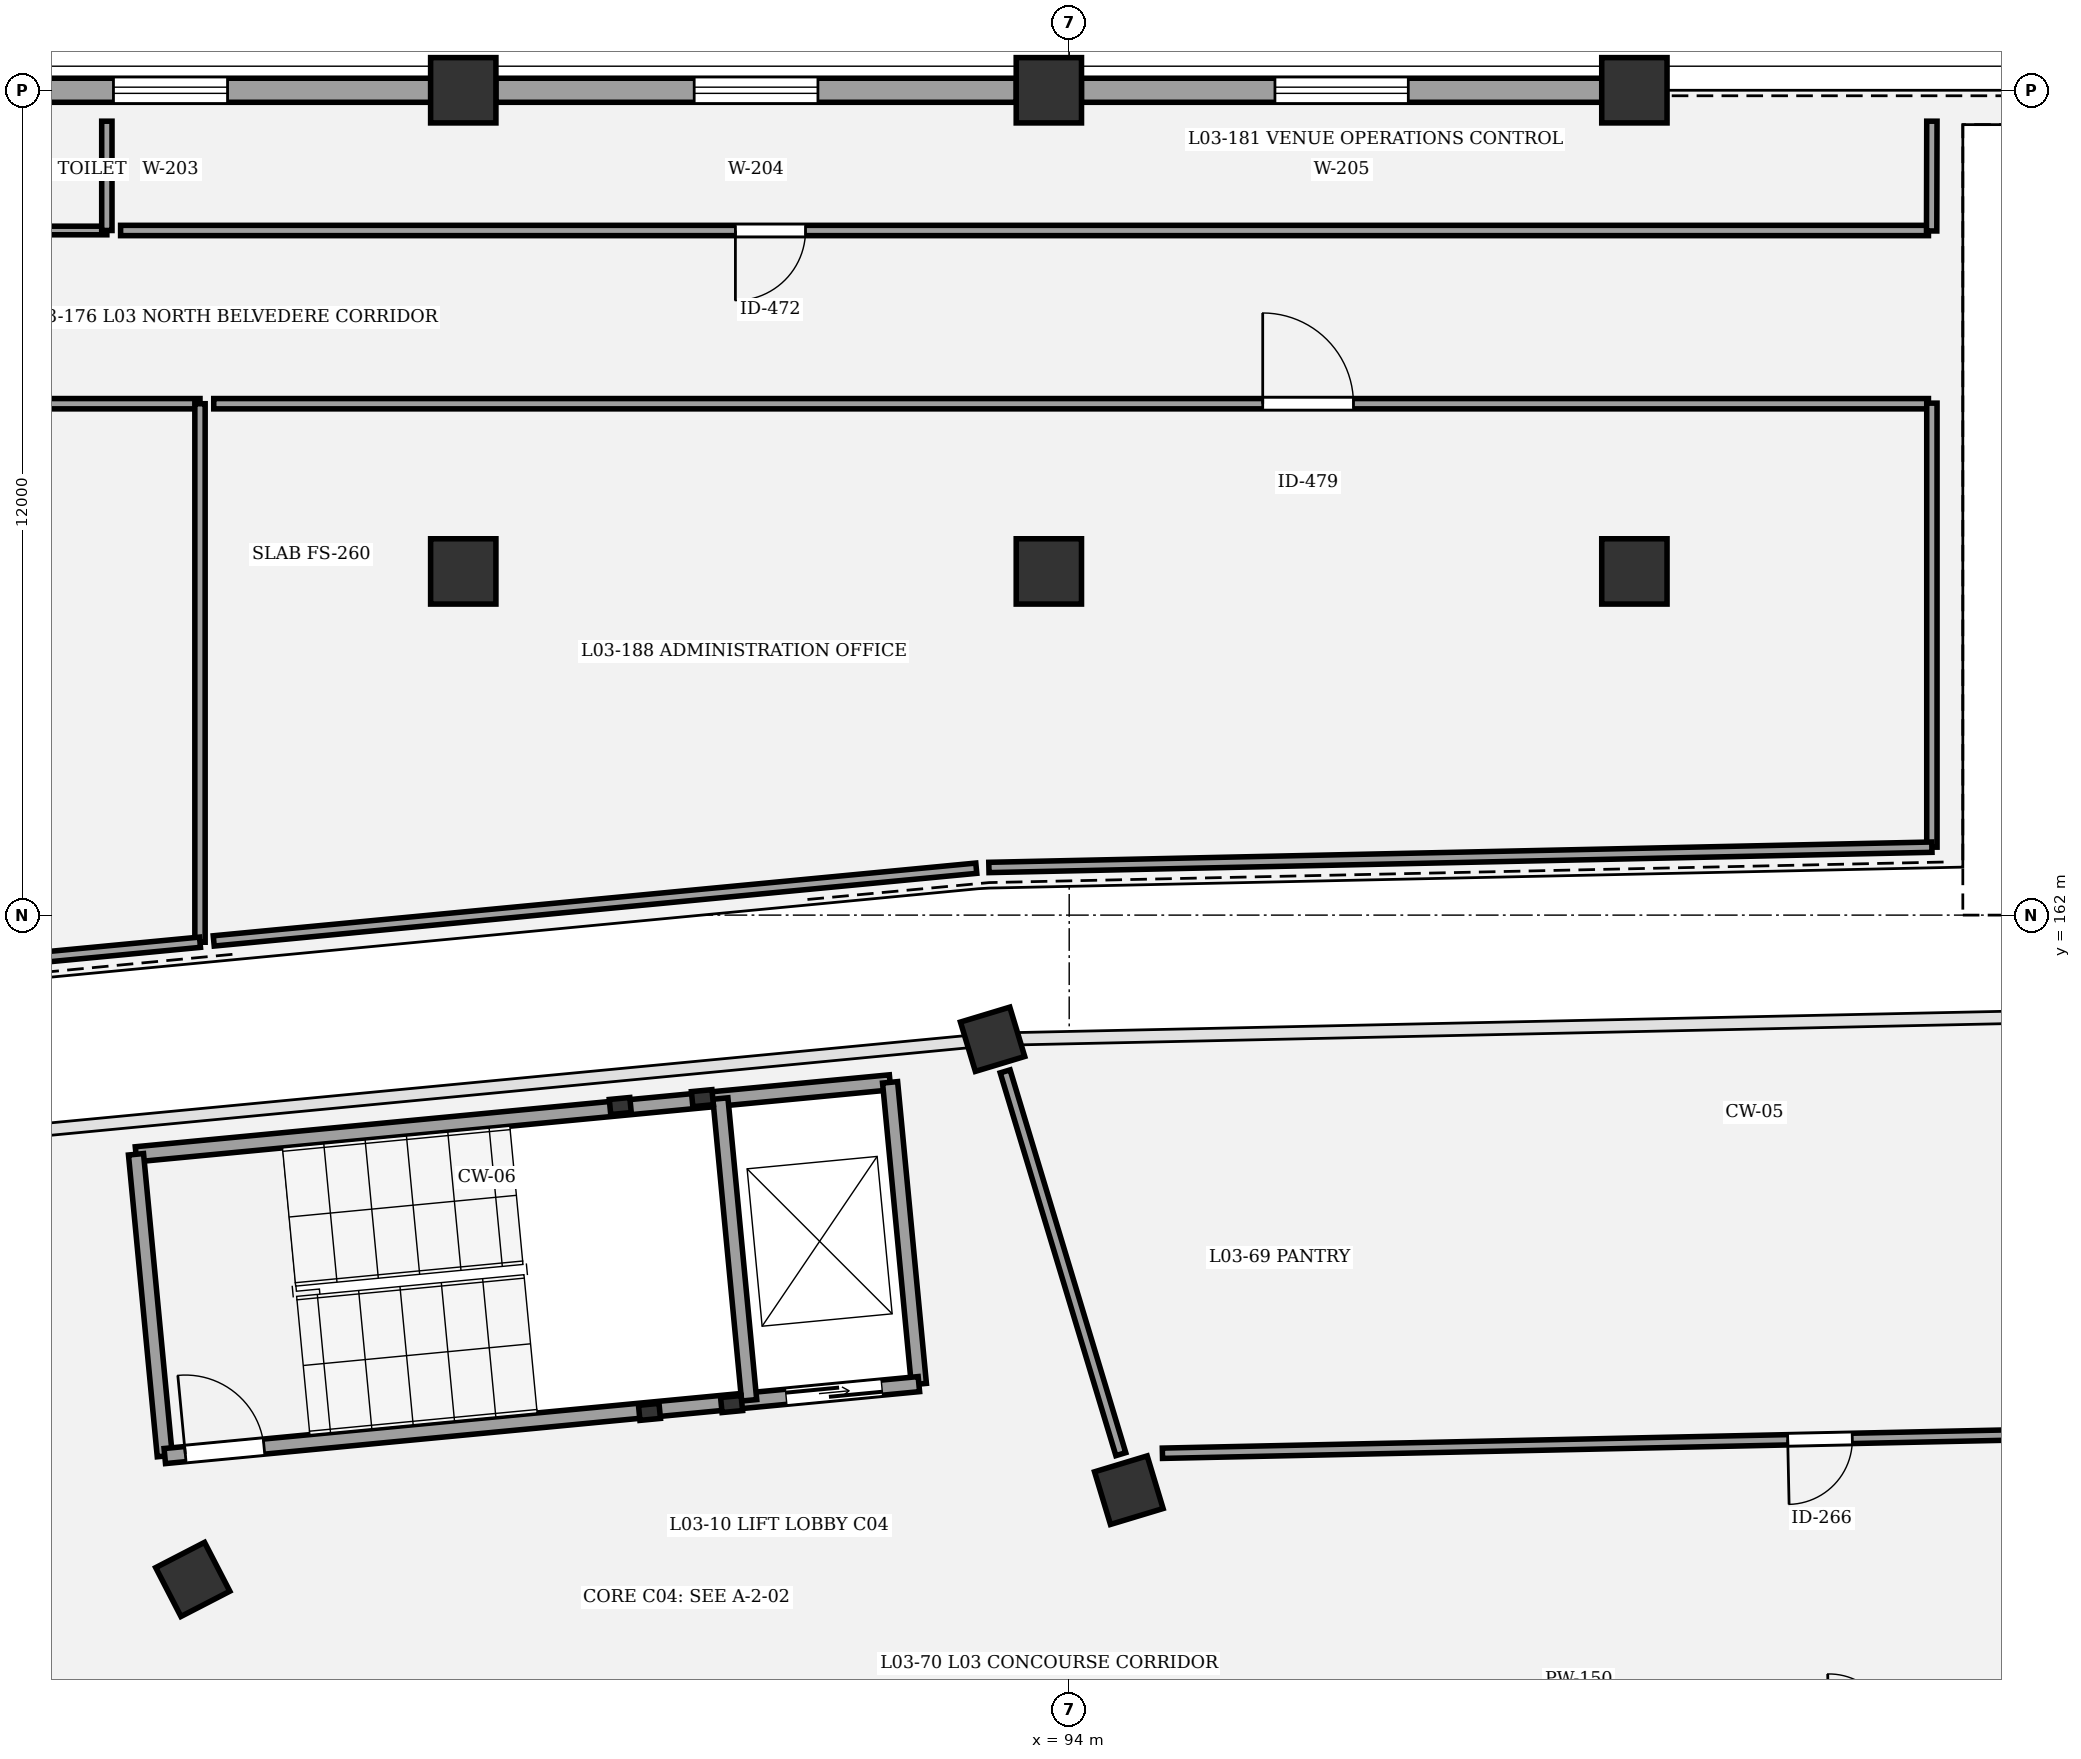
"""IFC4 building model, lengths in metres.
Left out: names, types, materials, properties, quantities, classifications, styles, units other than length and angle.
Written with IfcOpenShell. Run it as: python <this file> out.ifc"""

import sys

from ifc_helpers import new_model, si_unit, direction, frame, frame_2d, origin, origin_2d, place, context, subcontext, project, spatial, rectangle, circle, extrude, element, fill, save


model = new_model("IFC4")
c1 = context("Model", 3, precision=1e-05, world=origin(), true_north=direction((0.0, 1.0)))
c2 = subcontext(c1, "Body", "Model", "MODEL_VIEW")
j1 = project(units=[si_unit("LENGTHUNIT", "METRE"), si_unit("PLANEANGLEUNIT", "RADIAN")], contexts=[c1])
p1 = place(None, origin())
s1 = spatial("IfcSite", under=j1, at=p1, CompositionType="ELEMENT")
p2 = place(p1, origin())
s2 = spatial("IfcBuilding", under=s1, at=p2, CompositionType="ELEMENT")
p3 = place(p2, frame((0.0, 0.0, 14.7)))
s3 = spatial("IfcBuildingStorey", under=s2, at=p3, CompositionType="ELEMENT", Elevation=14.7)
p4 = place(p3, frame((94.867, 153.634, 0.0), z_axis=(0.0, 0.0, 1.0), x_axis=(-0.289198876314, 0.957269037387, 0.0)))
e1 = element("IfcColumn", 1, at=p4, inside=s3, PredefinedType="COLUMN", context=c2, shape_type="SweptSolid", body=[
    extrude(rectangle(XDim=0.8, YDim=0.8, at=origin_2d()), origin(), (0.0, 0.0, 1.0), 4.5),
])
p5 = place(p3, frame((92.885, 160.194, 0.0), z_axis=(0.0, 0.0, 1.0), x_axis=(-0.289198876314, 0.957269037387, 0.0)))
e2 = element("IfcColumn", 2, at=p5, inside=s3, PredefinedType="COLUMN", context=c2, shape_type="SweptSolid", body=[
    extrude(rectangle(XDim=0.75, YDim=0.75, at=origin_2d()), origin(), (0.0, 0.0, 1.0), 4.5),
])
p6 = place(p3, frame((81.25, 152.335, 0.0), z_axis=(0.0, 0.0, 1.0), x_axis=(-0.458959712465, 0.888457079624, 0.0)))
e3 = element("IfcColumn", 3, at=p6, inside=s3, PredefinedType="COLUMN", context=c2, shape_type="SweptSolid", body=[
    extrude(rectangle(XDim=0.8, YDim=0.8, at=origin_2d()), origin(), (0.0, 0.0, 1.0), 4.5),
])
for number, where, z_axis, x_axis in (
    (4, (85.185, 167.0, 0.0), (0.0, 0.0, 1.0), (1.0, 0.0, 0.0)),
    (5, (85.185, 174.0, 0.0), (0.0, 0.0, 1.0), (1.0, 0.0, 0.0)),
    (6, (93.704, 167.0, 0.0), (0.0, 0.0, 1.0), (1.0, 0.0, 0.0)),
    (7, (93.704, 174.0, 0.0), (0.0, 0.0, 1.0), (1.0, 0.0, 0.0)),
    (8, (102.222, 167.0, 0.0), (0.0, 0.0, 1.0), (1.0, 0.0, 0.0)),
    (9, (102.222, 174.0, 0.0), (0.0, 0.0, 1.0), (1.0, 0.0, 0.0)),
):
    element("IfcColumn", number, at=place(p3, frame(where, z_axis=z_axis, x_axis=x_axis)), inside=s3, PredefinedType="COLUMN", context=c2, shape_type="SweptSolid", body=[
        extrude(circle(Radius=0.475, at=origin_2d()), origin(), (0.0, 0.0, 1.0), 4.5),
    ])
p7 = place(p3, frame((77.14, 174.0, 0.0), z_axis=(0.0, 0.0, 1.0), x_axis=(1.0, 0.0, 0.0)))
e10 = element("IfcWall", 10, at=p7, inside=s3, PredefinedType="STANDARD", context=c2, shape_type="SweptSolid", body=[
    extrude(rectangle(XDim=7.572, YDim=0.35, at=frame_2d((3.786, 0.0))), origin(), (0.0, 0.0, 1.0), 3.26),
])
p8 = place(p7, frame((2.956, 0.0, 0.9)))
e11 = element("IfcOpeningElement", 11, at=p8, cuts=e10, PredefinedType="OPENING", context=c2, shape_type="SweptSolid", body=[
    extrude(rectangle(XDim=1.66, YDim=1.95, at=frame_2d((0.83, 0.975))), frame((0.0, 0.185, 0.0), z_axis=(0.0, -1.0, 0.0), x_axis=(1.0, 0.0, 0.0)), (0.0, 0.0, 1.0), 0.37),
])
p9 = place(p3, frame((85.658, 174.0, 0.0), z_axis=(0.0, 0.0, 1.0), x_axis=(1.0, 0.0, 0.0)))
e12 = element("IfcWall", 12, at=p9, inside=s3, PredefinedType="STANDARD", context=c2, shape_type="SweptSolid", body=[
    extrude(rectangle(XDim=7.573, YDim=0.35, at=frame_2d((3.787, 0.0))), origin(), (0.0, 0.0, 1.0), 3.26),
])
p10 = place(p9, frame((2.886, 0.0, 0.9)))
e13 = element("IfcOpeningElement", 13, at=p10, cuts=e12, PredefinedType="OPENING", context=c2, shape_type="SweptSolid", body=[
    extrude(rectangle(XDim=1.8, YDim=1.95, at=frame_2d((0.9, 0.975))), frame((0.0, 0.185, 0.0), z_axis=(0.0, -1.0, 0.0), x_axis=(1.0, 0.0, 0.0)), (0.0, 0.0, 1.0), 0.37),
])
p11 = place(p3, frame((94.177, 174.0, 0.0), z_axis=(0.0, 0.0, 1.0), x_axis=(1.0, 0.0, 0.0)))
e14 = element("IfcWall", 14, at=p11, inside=s3, PredefinedType="STANDARD", context=c2, shape_type="SweptSolid", body=[
    extrude(rectangle(XDim=7.572, YDim=0.35, at=frame_2d((3.786, 0.0))), origin(), (0.0, 0.0, 1.0), 3.26),
])
p12 = place(p11, frame((2.816, 0.0, 0.9)))
e15 = element("IfcOpeningElement", 15, at=p12, cuts=e14, PredefinedType="OPENING", context=c2, shape_type="SweptSolid", body=[
    extrude(rectangle(XDim=1.94, YDim=1.95, at=frame_2d((0.97, 0.975))), frame((0.0, 0.185, 0.0), z_axis=(0.0, -1.0, 0.0), x_axis=(1.0, 0.0, 0.0)), (0.0, 0.0, 1.0), 0.37),
])
for number, where, z_axis, x_axis in (
    (16, (87.894, 154.773, 0.0), (0.0, 0.0, 1.0), (0.995, 0.095, 0.0)),
    (17, (89.088, 154.887, 0.0), (0.0, 0.0, 1.0), (0.995, 0.095, 0.0)),
    (18, (88.664, 159.337, 0.0), (0.0, 0.0, 1.0), (0.995, 0.095, 0.0)),
    (19, (87.469, 159.223, 0.0), (0.0, 0.0, 1.0), (0.995, 0.095, 0.0)),
):
    element("IfcColumn", number, at=place(p3, frame(where, z_axis=z_axis, x_axis=x_axis)), inside=s3, PredefinedType="COLUMN", context=c2, shape_type="SweptSolid", body=[
        extrude(rectangle(XDim=0.3, YDim=0.22, at=origin_2d()), origin(), (0.0, 0.0, 1.0), 4.5),
    ])
p13 = place(p3, frame((80.424, 158.521, 0.0), z_axis=(0.0, 0.0, 1.0), x_axis=(0.99547962713, 0.094975322952, 0.0)))
e20 = element("IfcWall", 20, at=p13, inside=s3, PredefinedType="SHEAR", context=c2, shape_type="SweptSolid", body=[
    extrude(rectangle(XDim=11.02, YDim=0.22, at=frame_2d((5.51, 0.0))), origin(), (0.0, 0.0, 1.0), 4.25),
])
for number, where, z_axis, x_axis in (
    (21, (80.843, 154.13, 0.0), (0.0, 0.0, 1.0), (-0.095, 0.995, 0.0)),
    (22, (91.813, 155.177, 0.0), (0.0, 0.0, 1.0), (-0.095, 0.995, 0.0)),
):
    element("IfcWall", number, at=place(p3, frame(where, z_axis=z_axis, x_axis=x_axis)), inside=s3, PredefinedType="SHEAR", context=c2, shape_type="SweptSolid", body=[
        extrude(rectangle(XDim=4.41, YDim=0.22, at=frame_2d((2.205, 0.0))), origin(), (0.0, 0.0, 1.0), 4.25),
    ])
p14 = place(p3, frame((80.843, 154.13, 0.0), z_axis=(0.0, 0.0, 1.0), x_axis=(0.995479427285, 0.094977417594, 0.0)))
e23 = element("IfcWall", 23, at=p14, inside=s3, PredefinedType="SHEAR", context=c2, shape_type="SweptSolid", body=[
    extrude(rectangle(XDim=11.02, YDim=0.22, at=frame_2d((5.51, 0.0))), origin(), (0.0, 0.0, 1.0), 4.25),
])
p15 = place(p14, frame((0.3, 0.0, 0.0)))
e24 = element("IfcOpeningElement", 24, at=p15, cuts=e23, PredefinedType="OPENING", context=c2, shape_type="SweptSolid", body=[
    extrude(rectangle(XDim=1.15, YDim=2.15, at=frame_2d((0.575, 1.075))), frame((0.0, 0.12, 0.0), z_axis=(0.0, -1.0, 0.0), x_axis=(1.0, 0.0, 0.0)), (0.0, 0.0, 1.0), 0.24),
])
p16 = place(p14, frame((9.08, 0.0, 0.0)))
e25 = element("IfcOpeningElement", 25, at=p16, cuts=e23, PredefinedType="OPENING", context=c2, shape_type="SweptSolid", body=[
    extrude(rectangle(XDim=1.4, YDim=2.25, at=frame_2d((0.7, 1.125))), frame((0.0, 0.12, 0.0), z_axis=(0.0, -1.0, 0.0), x_axis=(1.0, 0.0, 0.0)), (0.0, 0.0, 1.0), 0.24),
])
p17 = place(p3, frame((89.344, 154.941, 0.0), z_axis=(0.0, 0.0, 1.0), x_axis=(-0.094942328893, 0.995482774429, 0.0)))
e26 = element("IfcWall", 26, at=p17, inside=s3, PredefinedType="SHEAR", context=c2, shape_type="SweptSolid", body=[
    extrude(rectangle(XDim=4.41, YDim=0.22, at=frame_2d((2.205, 0.0))), origin(), (0.0, 0.0, 1.0), 4.25),
])
p18 = place(p3, frame((114.489, 154.583, 0.0), z_axis=(0.0, 0.0, 1.0), x_axis=(-0.999768107727, -0.021534409017, 0.0)))
e27 = element("IfcWall", 27, at=p18, inside=s3, PredefinedType="PARTITIONING", context=c2, shape_type="SweptSolid", body=[
    extrude(rectangle(XDim=19.137, YDim=0.15, at=frame_2d((9.569, 0.0))), origin(), (0.0, 0.0, 1.0), 3.25),
])
p19 = place(p18, frame((9.099, 0.0, 0.0)))
e28 = element("IfcOpeningElement", 28, at=p19, cuts=e27, PredefinedType="OPENING", context=c2, shape_type="SweptSolid", body=[
    extrude(rectangle(XDim=0.94, YDim=2.2, at=frame_2d((0.47, 1.1))), frame((0.0, 0.085, 0.0), z_axis=(0.0, -1.0, 0.0), x_axis=(1.0, 0.0, 0.0)), (0.0, 0.0, 1.0), 0.17),
])
p20 = place(p3, frame((80.0, 171.96, 0.0), z_axis=(0.0, 0.0, 1.0), x_axis=(-1.0, 0.0, 0.0)))
e29 = element("IfcWall", 29, at=p20, inside=s3, PredefinedType="PARTITIONING", context=c2, shape_type="SweptSolid", body=[
    extrude(rectangle(XDim=26.1, YDim=0.125, at=frame_2d((13.05, 0.0))), origin(), (0.0, 0.0, 1.0), 3.25),
])
p21 = place(p20, frame((23.576, 0.0, 0.0)))
e30 = element("IfcOpeningElement", 30, at=p21, cuts=e29, PredefinedType="OPENING", context=c2, shape_type="SweptSolid", body=[
    extrude(rectangle(XDim=0.98, YDim=2.1, at=frame_2d((0.49, 1.05))), frame((0.0, 0.073, 0.0), z_axis=(0.0, -1.0, 0.0), x_axis=(1.0, 0.0, 0.0)), (0.0, 0.0, 1.0), 0.145),
])
p22 = place(p3, frame((106.5, 171.96, 0.0), z_axis=(0.0, 0.0, 1.0), x_axis=(-1.0, 0.0, 0.0)))
e31 = element("IfcWall", 31, at=p22, inside=s3, PredefinedType="PARTITIONING", context=c2, shape_type="SweptSolid", body=[
    extrude(rectangle(XDim=26.3, YDim=0.15, at=frame_2d((13.15, 0.0))), origin(), (0.0, 0.0, 1.0), 3.25),
])
p23 = place(p22, frame((16.336, 0.0, 0.0)))
e32 = element("IfcOpeningElement", 32, at=p23, cuts=e31, PredefinedType="OPENING", context=c2, shape_type="SweptSolid", body=[
    extrude(rectangle(XDim=1.02, YDim=2.1, at=frame_2d((0.51, 1.05))), frame((0.0, 0.085, 0.0), z_axis=(0.0, -1.0, 0.0), x_axis=(1.0, 0.0, 0.0)), (0.0, 0.0, 1.0), 0.17),
])
p24 = place(p3, frame((56.36, 169.44, 0.0), z_axis=(0.0, 0.0, 1.0), x_axis=(1.0, 0.0, 0.0)))
e33 = element("IfcWall", 33, at=p24, inside=s3, PredefinedType="PARTITIONING", context=c2, shape_type="SweptSolid", body=[
    extrude(rectangle(XDim=24.995, YDim=0.15, at=frame_2d((12.498, 0.0))), origin(), (0.0, 0.0, 1.0), 3.25),
])
p25 = place(p24, frame((15.332, 0.0, 0.0)))
e34 = element("IfcOpeningElement", 34, at=p25, cuts=e33, PredefinedType="OPENING", context=c2, shape_type="SweptSolid", body=[
    extrude(rectangle(XDim=1.26, YDim=2.1, at=frame_2d((0.63, 1.05))), frame((0.0, 0.085, 0.0), z_axis=(0.0, -1.0, 0.0), x_axis=(1.0, 0.0, 0.0)), (0.0, 0.0, 1.0), 0.17),
])
p26 = place(p3, frame((81.555, 169.44, 0.0), z_axis=(0.0, 0.0, 1.0), x_axis=(1.0, 0.0, 0.0)))
e35 = element("IfcWall", 35, at=p26, inside=s3, PredefinedType="PARTITIONING", context=c2, shape_type="SweptSolid", body=[
    extrude(rectangle(XDim=24.945, YDim=0.15, at=frame_2d((12.473, 0.0))), origin(), (0.0, 0.0, 1.0), 3.25),
])
p27 = place(p26, frame((15.26, 0.0, 0.0)))
e36 = element("IfcOpeningElement", 36, at=p27, cuts=e35, PredefinedType="OPENING", context=c2, shape_type="SweptSolid", body=[
    extrude(rectangle(XDim=1.32, YDim=2.1, at=frame_2d((0.66, 1.05))), frame((0.0, 0.085, 0.0), z_axis=(0.0, -1.0, 0.0), x_axis=(1.0, 0.0, 0.0)), (0.0, 0.0, 1.0), 0.17),
])
p28 = place(p3, frame((94.751, 154.158, 0.0), z_axis=(0.0, 0.0, 1.0), x_axis=(-0.289195444178, 0.957270074256, 0.0)))
e37 = element("IfcWall", 37, at=p28, inside=s3, PredefinedType="PARTITIONING", context=c2, shape_type="SweptSolid", body=[
    extrude(rectangle(XDim=5.817, YDim=0.15, at=frame_2d((2.909, 0.0))), origin(), (0.0, 0.0, 1.0), 3.25),
])
p29 = place(p3, frame((80.0, 173.55, 0.0), z_axis=(0.0, 0.0, 1.0), x_axis=(0.0, -1.0, 0.0)))
e38 = element("IfcWall", 38, at=p29, inside=s3, PredefinedType="PARTITIONING", context=c2, shape_type="SweptSolid", body=[
    extrude(rectangle(XDim=1.59, YDim=0.15, at=frame_2d((0.795, 0.0))), origin(), (0.0, 0.0, 1.0), 3.25),
])
p30 = place(p3, frame((106.55, 173.55, 0.0), z_axis=(0.0, 0.0, 1.0), x_axis=(-0.002293221305, -0.999997370565, 0.0)))
e39 = element("IfcWall", 39, at=p30, inside=s3, PredefinedType="PARTITIONING", context=c2, shape_type="SweptSolid", body=[
    extrude(rectangle(XDim=1.597, YDim=0.15, at=frame_2d((0.798, 0.0))), origin(), (0.0, 0.0, 1.0), 3.25),
])
p31 = place(p3, frame((81.355, 169.44, 0.0), z_axis=(0.0, 0.0, 1.0), x_axis=(0.0, -1.0, 0.0)))
e40 = element("IfcWall", 40, at=p31, inside=s3, PredefinedType="PARTITIONING", context=c2, shape_type="SweptSolid", body=[
    extrude(rectangle(XDim=7.834, YDim=0.15, at=frame_2d((3.917, 0.0))), origin(), (0.0, 0.0, 1.0), 3.25),
])
p32 = place(p3, frame((81.355, 161.606, 0.0), z_axis=(0.0, 0.0, 1.0), x_axis=(-0.995481155674, -0.094959300221, 0.0)))
e41 = element("IfcWall", 41, at=p32, inside=s3, PredefinedType="PARTITIONING", context=c2, shape_type="SweptSolid", body=[
    extrude(rectangle(XDim=3.682, YDim=0.15, at=frame_2d((1.841, 0.0))), origin(), (0.0, 0.0, 1.0), 3.25),
])
p33 = place(p3, frame((92.648, 162.683, 0.0), z_axis=(0.0, 0.0, 1.0), x_axis=(-0.995483944756, -0.094930057059, 0.0)))
e42 = element("IfcWall", 42, at=p33, inside=s3, PredefinedType="PARTITIONING", context=c2, shape_type="SweptSolid", body=[
    extrude(rectangle(XDim=11.144, YDim=0.15, at=frame_2d((5.572, 0.0))), origin(), (0.0, 0.0, 1.0), 3.25),
])
p34 = place(p3, frame((106.55, 169.448, 0.0), z_axis=(0.0, 0.0, 1.0), x_axis=(0.0, -1.0, 0.0)))
e43 = element("IfcWall", 43, at=p34, inside=s3, PredefinedType="PARTITIONING", context=c2, shape_type="SweptSolid", body=[
    extrude(rectangle(XDim=6.46, YDim=0.15, at=frame_2d((3.23, 0.0))), origin(), (0.0, 0.0, 1.0), 3.25),
])
p35 = place(p3, frame((106.55, 162.989, 0.0), z_axis=(0.0, 0.0, 1.0), x_axis=(-0.999768230535, -0.021528706714, 0.0)))
e44 = element("IfcWall", 44, at=p35, inside=s3, PredefinedType="PARTITIONING", context=c2, shape_type="SweptSolid", body=[
    extrude(rectangle(XDim=13.722, YDim=0.15, at=frame_2d((6.861, 0.0))), origin(), (0.0, 0.0, 1.0), 3.25),
])
p36 = place(p8, origin())
e45 = element("IfcWindow", 45, at=p36, inside=s3, PartitioningType="SINGLE_PANEL", PredefinedType="WINDOW", context=c2, shape_type="SweptSolid", body=[
    extrude(rectangle(XDim=1.66, YDim=1.95, at=frame_2d((0.83, 0.975))), frame((0.0, 0.03, 0.0), z_axis=(0.0, -1.0, 0.0), x_axis=(1.0, 0.0, 0.0)), (0.0, 0.0, 1.0), 0.06),
])
fill(e11, e45)
p37 = place(p10, origin())
e46 = element("IfcWindow", 46, at=p37, inside=s3, PartitioningType="SINGLE_PANEL", PredefinedType="WINDOW", context=c2, shape_type="SweptSolid", body=[
    extrude(rectangle(XDim=1.8, YDim=1.95, at=frame_2d((0.9, 0.975))), frame((0.0, 0.03, 0.0), z_axis=(0.0, -1.0, 0.0), x_axis=(1.0, 0.0, 0.0)), (0.0, 0.0, 1.0), 0.06),
])
fill(e13, e46)
p38 = place(p12, origin())
e47 = element("IfcWindow", 47, at=p38, inside=s3, PartitioningType="SINGLE_PANEL", PredefinedType="WINDOW", context=c2, shape_type="SweptSolid", body=[
    extrude(rectangle(XDim=1.94, YDim=1.95, at=frame_2d((0.97, 0.975))), frame((0.0, 0.03, 0.0), z_axis=(0.0, -1.0, 0.0), x_axis=(1.0, 0.0, 0.0)), (0.0, 0.0, 1.0), 0.06),
])
fill(e15, e47)
p39 = place(p15, origin())
e48 = element("IfcDoor", 48, at=p39, inside=s3, OperationType="SINGLE_SWING_LEFT", PredefinedType="DOOR", context=c2, shape_type="SweptSolid", body=[
    extrude(rectangle(XDim=1.15, YDim=2.15, at=frame_2d((0.575, 1.075))), frame((0.0, 0.025, 0.0), z_axis=(0.0, -1.0, 0.0), x_axis=(1.0, 0.0, 0.0)), (0.0, 0.0, 1.0), 0.05),
])
fill(e24, e48)
p40 = place(p16, origin())
e49 = element("IfcDoor", 49, at=p40, inside=s3, OperationType="DOUBLE_DOOR_SLIDING", PredefinedType="DOOR", context=c2, shape_type="SweptSolid", body=[
    extrude(rectangle(XDim=1.4, YDim=2.25, at=frame_2d((0.7, 1.125))), frame((0.0, 0.025, 0.0), z_axis=(0.0, -1.0, 0.0), x_axis=(1.0, 0.0, 0.0)), (0.0, 0.0, 1.0), 0.05),
])
fill(e25, e49)
p41 = place(p19, origin())
e50 = element("IfcDoor", 50, at=p41, inside=s3, OperationType="SINGLE_SWING_RIGHT", PredefinedType="DOOR", context=c2, shape_type="SweptSolid", body=[
    extrude(rectangle(XDim=0.94, YDim=2.2, at=frame_2d((0.47, 1.1))), frame((0.0, 0.025, 0.0), z_axis=(0.0, -1.0, 0.0), x_axis=(1.0, 0.0, 0.0)), (0.0, 0.0, 1.0), 0.05),
])
fill(e28, e50)
p42 = place(p23, origin())
e51 = element("IfcDoor", 51, at=p42, inside=s3, OperationType="SINGLE_SWING_RIGHT", PredefinedType="DOOR", context=c2, shape_type="SweptSolid", body=[
    extrude(rectangle(XDim=1.02, YDim=2.1, at=frame_2d((0.51, 1.05))), frame((0.0, 0.025, 0.0), z_axis=(0.0, -1.0, 0.0), x_axis=(1.0, 0.0, 0.0)), (0.0, 0.0, 1.0), 0.05),
])
fill(e32, e51)
p43 = place(p27, origin())
e52 = element("IfcDoor", 52, at=p43, inside=s3, OperationType="SINGLE_SWING_LEFT", PredefinedType="DOOR", context=c2, shape_type="SweptSolid", body=[
    extrude(rectangle(XDim=1.32, YDim=2.1, at=frame_2d((0.66, 1.05))), frame((0.0, 0.025, 0.0), z_axis=(0.0, -1.0, 0.0), x_axis=(1.0, 0.0, 0.0)), (0.0, 0.0, 1.0), 0.05),
])
fill(e36, e52)
save(model, sys.argv[1])
